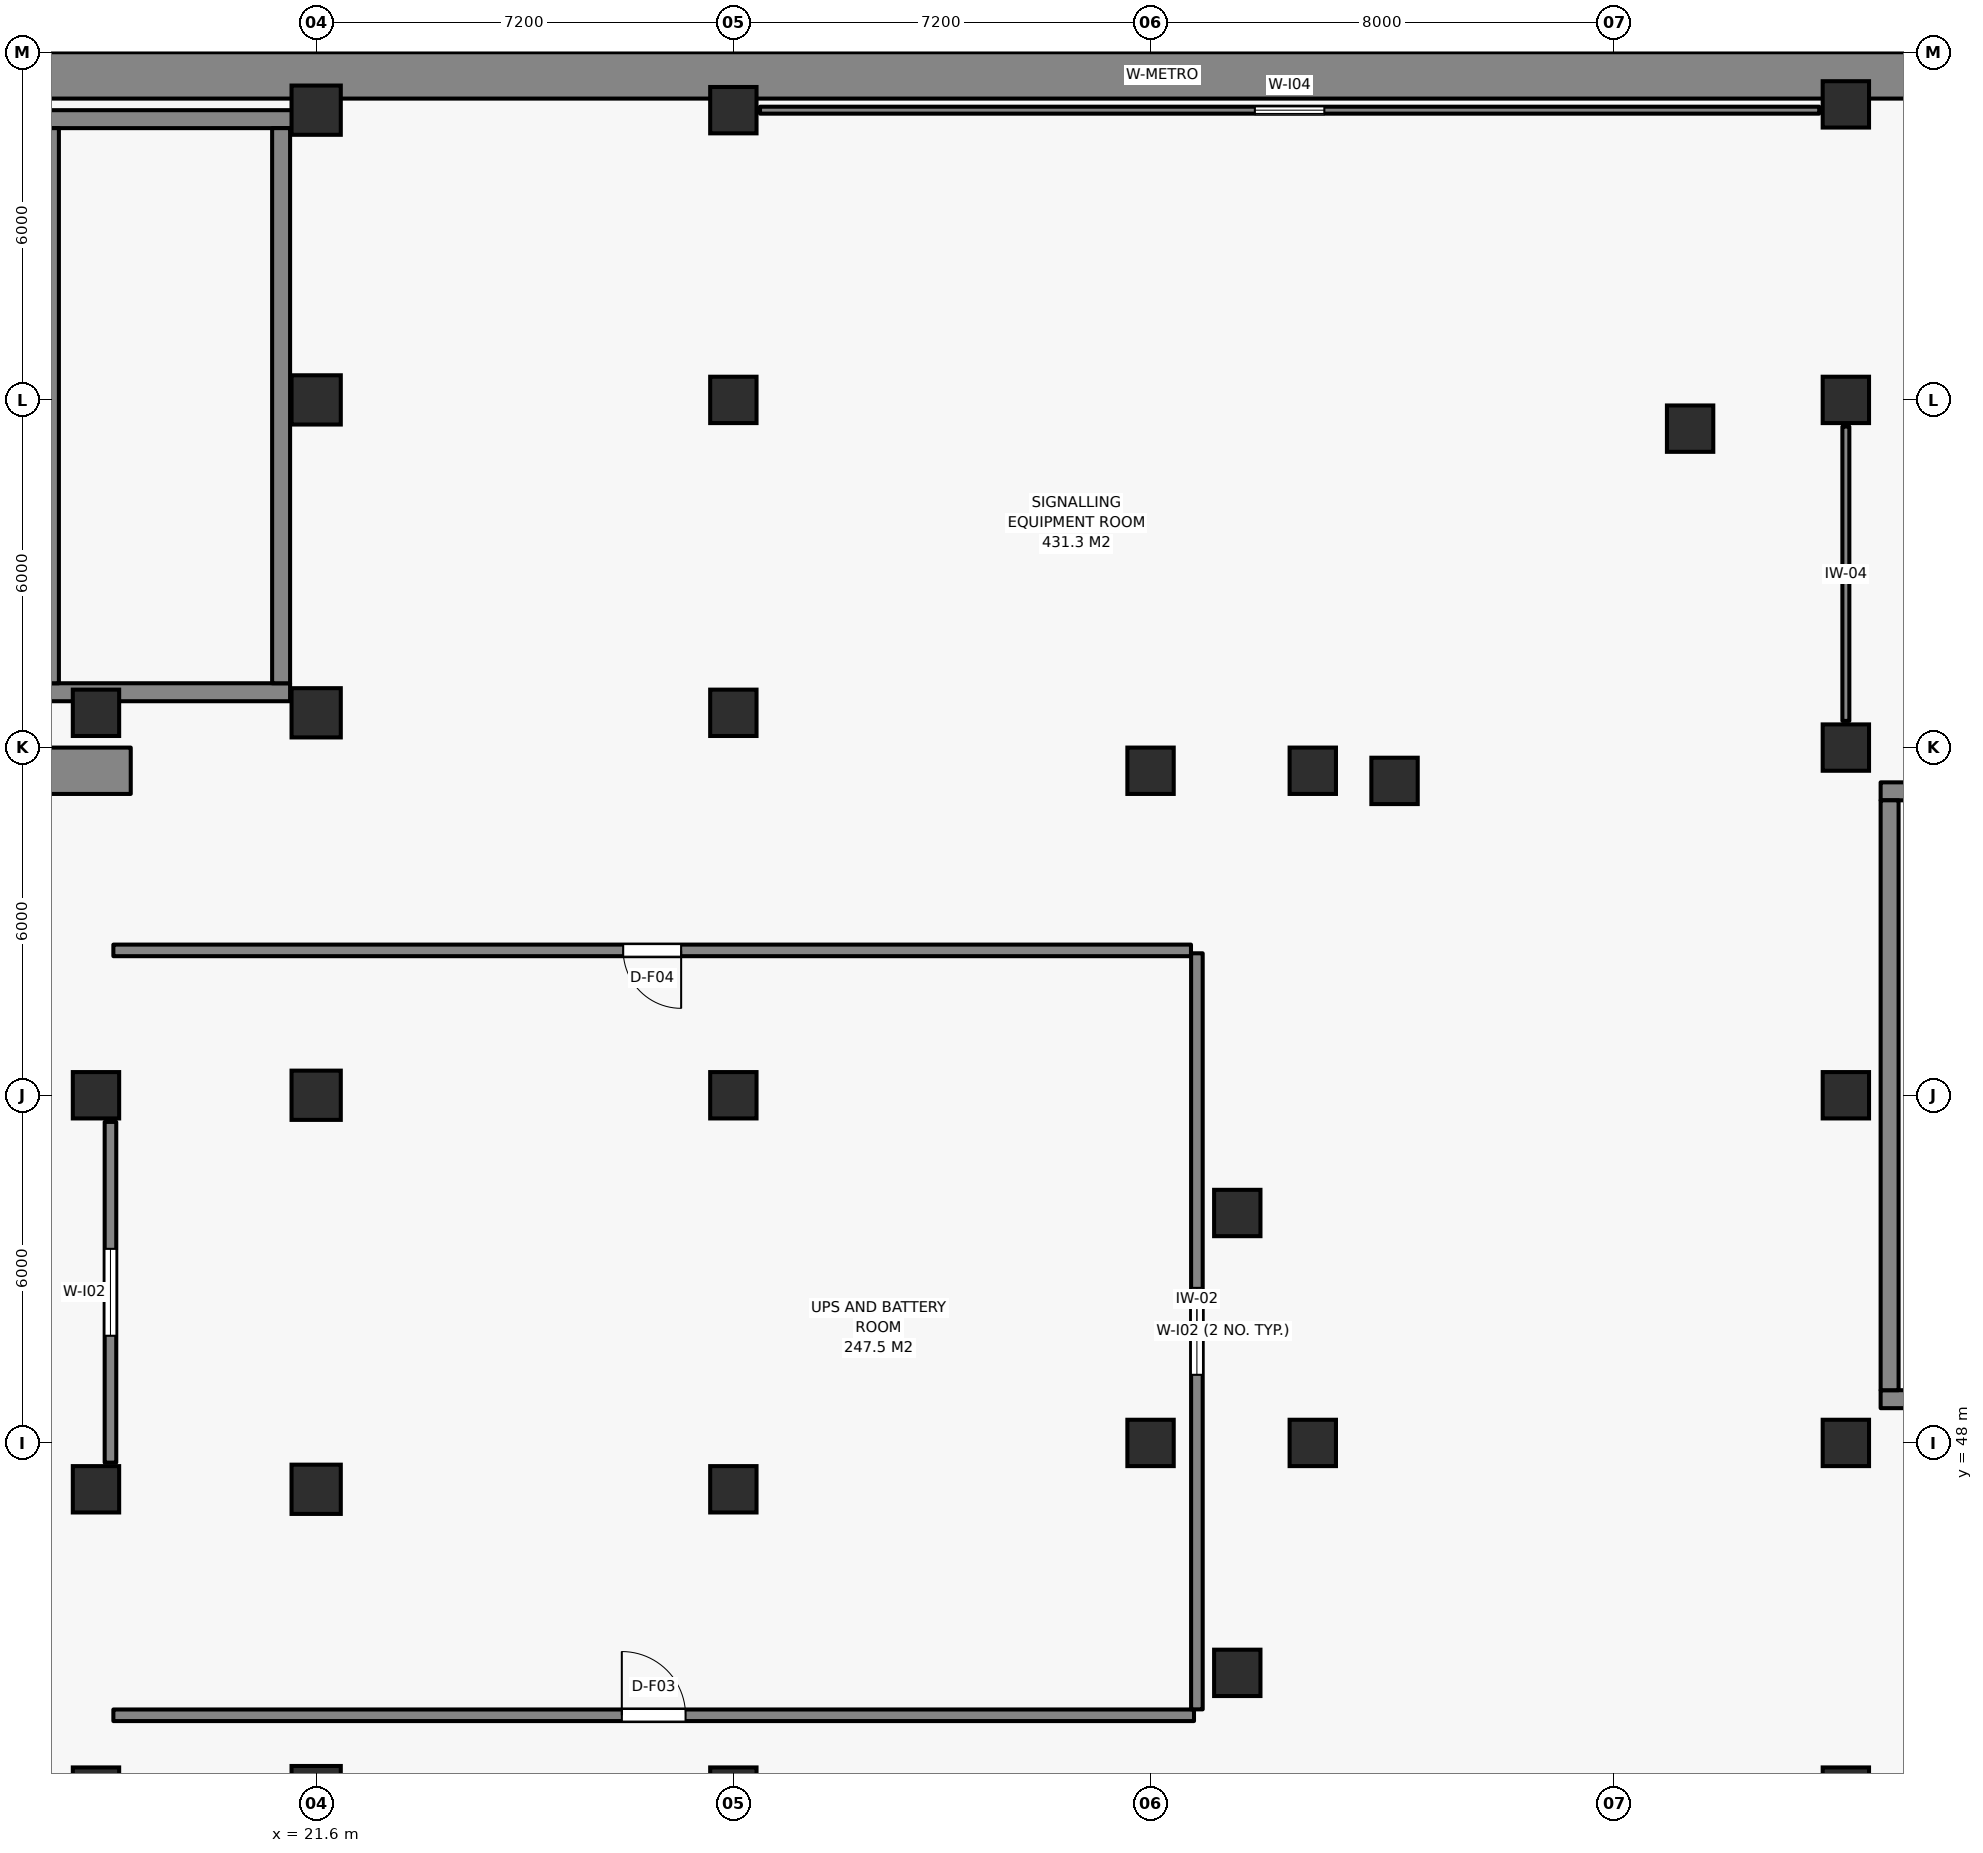
"""IFC4 building model, lengths in metres.
Left out: names, types, materials, properties, quantities, classifications, styles, units other than length and angle.
Written with IfcOpenShell. Run it as: python <this file> out.ifc"""

import sys

from ifc_helpers import new_model, si_unit, direction, frame, frame_2d, origin, origin_2d, place, context, subcontext, project, spatial, rectangle, extrude, element, fill, save


model = new_model("IFC4")
c1 = context("Model", 3, precision=1e-05, world=origin(), true_north=direction((0.0, 1.0)))
c2 = subcontext(c1, "Body", "Model", "MODEL_VIEW")
j1 = project(units=[si_unit("LENGTHUNIT", "METRE"), si_unit("PLANEANGLEUNIT", "RADIAN")], contexts=[c1])
p1 = place(None, origin())
s1 = spatial("IfcSite", under=j1, at=p1, CompositionType="ELEMENT")
p2 = place(p1, origin())
s2 = spatial("IfcBuilding", under=s1, at=p2, CompositionType="ELEMENT")
p3 = place(p2, frame((0.0, 0.0, -7.2)))
s3 = spatial("IfcBuildingStorey", under=s2, at=p3, CompositionType="ELEMENT", Elevation=-7.2)
p4 = place(p3, frame((14.4, 71.6, 0.0), z_axis=(0.0, 0.0, 1.0), x_axis=(1.0, 0.0, 0.0)))
e1 = element("IfcWall", 1, at=p4, inside=s3, PredefinedType="SHEAR", context=c2, shape_type="SweptSolid", body=[
    extrude(rectangle(XDim=130.0, YDim=0.8, at=frame_2d((65.0, 0.0))), origin(), (0.0, 0.0, 1.0), 6.8),
])
p5 = place(p3, frame((14.4, 59.6, 0.0), z_axis=(0.0, 0.0, 1.0), x_axis=(1.0, 0.0, 0.0)))
e2 = element("IfcWall", 2, at=p5, inside=s3, PredefinedType="SHEAR", context=c2, shape_type="SweptSolid", body=[
    extrude(rectangle(XDim=4.0, YDim=0.8, at=frame_2d((2.0, 0.0))), origin(), (0.0, 0.0, 1.0), 6.8),
])
for number, where, z_axis, x_axis in (
    (3, (48.6, 48.755, 0.0), (0.0, 0.0, 1.0), (1.0, 0.0, 0.0)),
    (4, (48.6, 59.245, 0.0), (0.0, 0.0, 1.0), (1.0, 0.0, 0.0)),
):
    element("IfcWall", number, at=place(p3, frame(where, z_axis=z_axis, x_axis=x_axis)), inside=s3, PredefinedType="SHEAR", context=c2, shape_type="SweptSolid", body=[
        extrude(rectangle(XDim=4.8, YDim=0.31, at=frame_2d((2.4, 0.0))), origin(), (0.0, 0.0, 1.0), 6.8),
    ])
p6 = place(p3, frame((48.755, 48.91, 0.0), z_axis=(0.0, 0.0, 1.0), x_axis=(0.0, 1.0, 0.0)))
e5 = element("IfcWall", 5, at=p6, inside=s3, PredefinedType="SHEAR", context=c2, shape_type="SweptSolid", body=[
    extrude(rectangle(XDim=10.18, YDim=0.31, at=frame_2d((5.09, 0.0))), origin(), (0.0, 0.0, 1.0), 6.8),
])
p7 = place(p3, frame((16.85, 60.955, 0.0), z_axis=(0.0, 0.0, 1.0), x_axis=(1.0, 0.0, 0.0)))
e6 = element("IfcWall", 6, at=p7, inside=s3, PredefinedType="SHEAR", context=c2, shape_type="SweptSolid", body=[
    extrude(rectangle(XDim=4.3, YDim=0.31, at=frame_2d((2.15, 0.0))), origin(), (0.0, 0.0, 1.0), 6.8),
])
p8 = place(p3, frame((16.85, 70.845, 0.0), z_axis=(0.0, 0.0, 1.0), x_axis=(1.0, 0.0, 0.0)))
e7 = element("IfcWall", 7, at=p8, inside=s3, PredefinedType="SHEAR", context=c2, shape_type="SweptSolid", body=[
    extrude(rectangle(XDim=4.6, YDim=0.31, at=frame_2d((2.3, 0.0))), origin(), (0.0, 0.0, 1.0), 6.8),
])
for number, where, z_axis, x_axis in (
    (8, (17.005, 61.11, 0.0), (0.0, 0.0, 1.0), (0.0, 1.0, 0.0)),
    (9, (20.995, 61.11, 0.0), (0.0, 0.0, 1.0), (0.0, 1.0, 0.0)),
):
    element("IfcWall", number, at=place(p3, frame(where, z_axis=z_axis, x_axis=x_axis)), inside=s3, PredefinedType="SHEAR", context=c2, shape_type="SweptSolid", body=[
        extrude(rectangle(XDim=9.58, YDim=0.31, at=frame_2d((4.79, 0.0))), origin(), (0.0, 0.0, 1.0), 6.8),
    ])
for number, where, z_axis, x_axis in (
    (10, (17.8, 42.0, 0.0), (0.0, 0.0, 1.0), (1.0, 0.0, 0.0)),
    (11, (17.8, 47.2, 0.0), (0.0, 0.0, 1.0), (1.0, 0.0, 0.0)),
    (12, (17.8, 54.0, 0.0), (0.0, 0.0, 1.0), (1.0, 0.0, 0.0)),
    (13, (17.8, 60.6, 0.0), (0.0, 0.0, 1.0), (1.0, 0.0, 0.0)),
):
    element("IfcColumn", number, at=place(p3, frame(where, z_axis=z_axis, x_axis=x_axis)), inside=s3, PredefinedType="COLUMN", context=c2, shape_type="SweptSolid", body=[
        extrude(rectangle(XDim=0.8, YDim=0.8, at=origin_2d()), origin(), (0.0, 0.0, 1.0), 7.2),
    ])
for number, where, z_axis, x_axis in (
    (14, (21.6, 42.0, 0.0), (0.0, 0.0, 1.0), (1.0, 0.0, 0.0)),
    (15, (21.6, 47.2, 0.0), (0.0, 0.0, 1.0), (1.0, 0.0, 0.0)),
    (16, (21.6, 54.0, 0.0), (0.0, 0.0, 1.0), (1.0, 0.0, 0.0)),
    (17, (21.6, 60.6, 0.0), (0.0, 0.0, 1.0), (1.0, 0.0, 0.0)),
    (18, (21.6, 66.0, 0.0), (0.0, 0.0, 1.0), (1.0, 0.0, 0.0)),
    (19, (21.6, 71.0, 0.0), (0.0, 0.0, 1.0), (1.0, 0.0, 0.0)),
):
    element("IfcColumn", number, at=place(p3, frame(where, z_axis=z_axis, x_axis=x_axis)), inside=s3, PredefinedType="COLUMN", context=c2, shape_type="SweptSolid", body=[
        extrude(rectangle(XDim=0.85, YDim=0.85, at=origin_2d()), origin(), (0.0, 0.0, 1.0), 7.2),
    ])
for number, where, z_axis, x_axis in (
    (20, (28.8, 42.0, 0.0), (0.0, 0.0, 1.0), (1.0, 0.0, 0.0)),
    (21, (28.8, 47.2, 0.0), (0.0, 0.0, 1.0), (1.0, 0.0, 0.0)),
    (22, (28.8, 54.0, 0.0), (0.0, 0.0, 1.0), (1.0, 0.0, 0.0)),
    (23, (28.8, 60.6, 0.0), (0.0, 0.0, 1.0), (1.0, 0.0, 0.0)),
    (24, (28.8, 66.0, 0.0), (0.0, 0.0, 1.0), (1.0, 0.0, 0.0)),
    (25, (28.8, 71.0, 0.0), (0.0, 0.0, 1.0), (1.0, 0.0, 0.0)),
    (26, (36.0, 48.0, 0.0), (0.0, 0.0, 1.0), (1.0, 0.0, 0.0)),
    (27, (36.0, 59.6, 0.0), (0.0, 0.0, 1.0), (1.0, 0.0, 0.0)),
    (28, (38.8, 48.0, 0.0), (0.0, 0.0, 1.0), (1.0, 0.0, 0.0)),
    (29, (38.8, 59.6, 0.0), (0.0, 0.0, 1.0), (1.0, 0.0, 0.0)),
    (30, (48.0, 42.0, 0.0), (0.0, 0.0, 1.0), (1.0, 0.0, 0.0)),
    (31, (48.0, 48.0, 0.0), (0.0, 0.0, 1.0), (1.0, 0.0, 0.0)),
    (32, (48.0, 54.0, 0.0), (0.0, 0.0, 1.0), (1.0, 0.0, 0.0)),
    (33, (48.0, 60.0, 0.0), (0.0, 0.0, 1.0), (1.0, 0.0, 0.0)),
    (34, (48.0, 66.0, 0.0), (0.0, 0.0, 1.0), (1.0, 0.0, 0.0)),
    (35, (48.0, 71.1, 0.0), (0.0, 0.0, 1.0), (1.0, 0.0, 0.0)),
    (36, (45.312, 65.504, 0.0), (0.0, 0.0, 1.0), (1.0, 0.0, 0.0)),
    (37, (40.211, 59.425, 0.0), (0.0, 0.0, 1.0), (1.0, 0.0, 0.0)),
    (38, (37.497, 51.968, 0.0), (0.0, 0.0, 1.0), (1.0, 0.0, 0.0)),
    (39, (37.497, 44.032, 0.0), (0.0, 0.0, 1.0), (1.0, 0.0, 0.0)),
):
    element("IfcColumn", number, at=place(p3, frame(where, z_axis=z_axis, x_axis=x_axis)), inside=s3, PredefinedType="COLUMN", context=c2, shape_type="SweptSolid", body=[
        extrude(rectangle(XDim=0.8, YDim=0.8, at=origin_2d()), origin(), (0.0, 0.0, 1.0), 7.2),
    ])
p9 = place(p3, frame((18.1, 43.3, 0.0), z_axis=(0.0, 0.0, 1.0), x_axis=(1.0, 0.0, 0.0)))
e40 = element("IfcWall", 40, at=p9, inside=s3, PredefinedType="PARTITIONING", context=c2, shape_type="SweptSolid", body=[
    extrude(rectangle(XDim=18.65, YDim=0.2, at=frame_2d((9.325, 0.0))), origin(), (0.0, 0.0, 1.0), 5.285),
])
p10 = place(p9, frame((8.775, 0.0, 0.0)))
e41 = element("IfcOpeningElement", 41, at=p10, cuts=e40, PredefinedType="OPENING", context=c2, shape_type="SweptSolid", body=[
    extrude(rectangle(XDim=1.1, YDim=2.15, at=frame_2d((0.55, 1.075))), frame((0.0, 0.11, 0.0), z_axis=(0.0, -1.0, 0.0), x_axis=(1.0, 0.0, 0.0)), (0.0, 0.0, 1.0), 0.22),
])
p11 = place(p3, frame((36.8, 43.402, 0.0), z_axis=(0.0, 0.0, 1.0), x_axis=(0.0, 1.0, 0.0)))
e42 = element("IfcWall", 42, at=p11, inside=s3, PredefinedType="PARTITIONING", context=c2, shape_type="SweptSolid", body=[
    extrude(rectangle(XDim=13.048, YDim=0.2, at=frame_2d((6.524, 0.0))), origin(), (0.0, 0.0, 1.0), 6.135),
])
p12 = place(p11, frame((5.774, 0.0, 1.05)))
e43 = element("IfcOpeningElement", 43, at=p12, cuts=e42, PredefinedType="OPENING", context=c2, shape_type="SweptSolid", body=[
    extrude(rectangle(XDim=1.5, YDim=1.2, at=frame_2d((0.75, 0.6))), frame((0.0, 0.11, 0.0), z_axis=(0.0, -1.0, 0.0), x_axis=(1.0, 0.0, 0.0)), (0.0, 0.0, 1.0), 0.22),
])
p13 = place(p3, frame((36.698, 56.5, 0.0), z_axis=(0.0, 0.0, 1.0), x_axis=(-1.0, 0.0, 0.0)))
e44 = element("IfcWall", 44, at=p13, inside=s3, PredefinedType="PARTITIONING", context=c2, shape_type="SweptSolid", body=[
    extrude(rectangle(XDim=18.598, YDim=0.2, at=frame_2d((9.299, 0.0))), origin(), (0.0, 0.0, 1.0), 5.285),
])
p14 = place(p13, frame((8.799, 0.0, 0.0)))
e45 = element("IfcOpeningElement", 45, at=p14, cuts=e44, PredefinedType="OPENING", context=c2, shape_type="SweptSolid", body=[
    extrude(rectangle(XDim=1.0, YDim=2.15, at=frame_2d((0.5, 1.075))), frame((0.0, 0.11, 0.0), z_axis=(0.0, -1.0, 0.0), x_axis=(1.0, 0.0, 0.0)), (0.0, 0.0, 1.0), 0.22),
])
p15 = place(p3, frame((18.05, 53.54, 0.0), z_axis=(0.0, 0.0, 1.0), x_axis=(0.0, -1.0, 0.0)))
e46 = element("IfcWall", 46, at=p15, inside=s3, PredefinedType="PARTITIONING", context=c2, shape_type="SweptSolid", body=[
    extrude(rectangle(XDim=5.88, YDim=0.2, at=frame_2d((2.94, 0.0))), origin(), (0.0, 0.0, 1.0), 5.685),
])
p16 = place(p15, frame((2.19, 0.0, 1.05)))
e47 = element("IfcOpeningElement", 47, at=p16, cuts=e46, PredefinedType="OPENING", context=c2, shape_type="SweptSolid", body=[
    extrude(rectangle(XDim=1.5, YDim=1.2, at=frame_2d((0.75, 0.6))), frame((0.0, 0.11, 0.0), z_axis=(0.0, -1.0, 0.0), x_axis=(1.0, 0.0, 0.0)), (0.0, 0.0, 1.0), 0.22),
])
p17 = place(p3, frame((48.0, 60.46, 0.0), z_axis=(0.0, 0.0, 1.0), x_axis=(0.0, 1.0, 0.0)))
e48 = element("IfcWall", 48, at=p17, inside=s3, PredefinedType="PARTITIONING", context=c2, shape_type="SweptSolid", body=[
    extrude(rectangle(XDim=5.08, YDim=0.12, at=frame_2d((2.54, 0.0))), origin(), (0.0, 0.0, 1.0), 5.785),
])
p18 = place(p3, frame((47.54, 71.0, 0.0), z_axis=(0.0, 0.0, 1.0), x_axis=(-1.0, 0.0, 0.0)))
e49 = element("IfcWall", 49, at=p18, inside=s3, PredefinedType="PARTITIONING", context=c2, shape_type="SweptSolid", body=[
    extrude(rectangle(XDim=18.28, YDim=0.12, at=frame_2d((9.14, 0.0))), origin(), (0.0, 0.0, 1.0), 5.685),
])
p19 = place(p18, frame((8.54, 0.0, 1.05)))
e50 = element("IfcOpeningElement", 50, at=p19, cuts=e49, PredefinedType="OPENING", context=c2, shape_type="SweptSolid", body=[
    extrude(rectangle(XDim=1.2, YDim=1.1, at=frame_2d((0.6, 0.55))), frame((0.0, 0.07, 0.0), z_axis=(0.0, -1.0, 0.0), x_axis=(1.0, 0.0, 0.0)), (0.0, 0.0, 1.0), 0.14),
])
p20 = place(p10, origin())
e51 = element("IfcDoor", 51, at=p20, inside=s3, OperationType="SINGLE_SWING_LEFT", PredefinedType="DOOR", context=c2, shape_type="SweptSolid", body=[
    extrude(rectangle(XDim=1.1, YDim=2.15, at=frame_2d((0.55, 1.075))), frame((0.0, 0.025, 0.0), z_axis=(0.0, -1.0, 0.0), x_axis=(1.0, 0.0, 0.0)), (0.0, 0.0, 1.0), 0.05),
])
fill(e41, e51)
p21 = place(p14, origin())
e52 = element("IfcDoor", 52, at=p21, inside=s3, OperationType="SINGLE_SWING_LEFT", PredefinedType="DOOR", context=c2, shape_type="SweptSolid", body=[
    extrude(rectangle(XDim=1.0, YDim=2.15, at=frame_2d((0.5, 1.075))), frame((0.0, 0.025, 0.0), z_axis=(0.0, -1.0, 0.0), x_axis=(1.0, 0.0, 0.0)), (0.0, 0.0, 1.0), 0.05),
])
fill(e45, e52)
p22 = place(p12, origin())
e53 = element("IfcWindow", 53, at=p22, inside=s3, PartitioningType="SINGLE_PANEL", PredefinedType="WINDOW", context=c2, shape_type="SweptSolid", body=[
    extrude(rectangle(XDim=1.5, YDim=1.2, at=frame_2d((0.75, 0.6))), frame((0.0, 0.03, 0.0), z_axis=(0.0, -1.0, 0.0), x_axis=(1.0, 0.0, 0.0)), (0.0, 0.0, 1.0), 0.06),
])
fill(e43, e53)
p23 = place(p16, origin())
e54 = element("IfcWindow", 54, at=p23, inside=s3, PartitioningType="SINGLE_PANEL", PredefinedType="WINDOW", context=c2, shape_type="SweptSolid", body=[
    extrude(rectangle(XDim=1.5, YDim=1.2, at=frame_2d((0.75, 0.6))), frame((0.0, 0.03, 0.0), z_axis=(0.0, -1.0, 0.0), x_axis=(1.0, 0.0, 0.0)), (0.0, 0.0, 1.0), 0.06),
])
fill(e47, e54)
p24 = place(p19, origin())
e55 = element("IfcWindow", 55, at=p24, inside=s3, PartitioningType="SINGLE_PANEL", PredefinedType="WINDOW", context=c2, shape_type="SweptSolid", body=[
    extrude(rectangle(XDim=1.2, YDim=1.1, at=frame_2d((0.6, 0.55))), frame((0.0, 0.03, 0.0), z_axis=(0.0, -1.0, 0.0), x_axis=(1.0, 0.0, 0.0)), (0.0, 0.0, 1.0), 0.06),
])
fill(e50, e55)
save(model, sys.argv[1])
